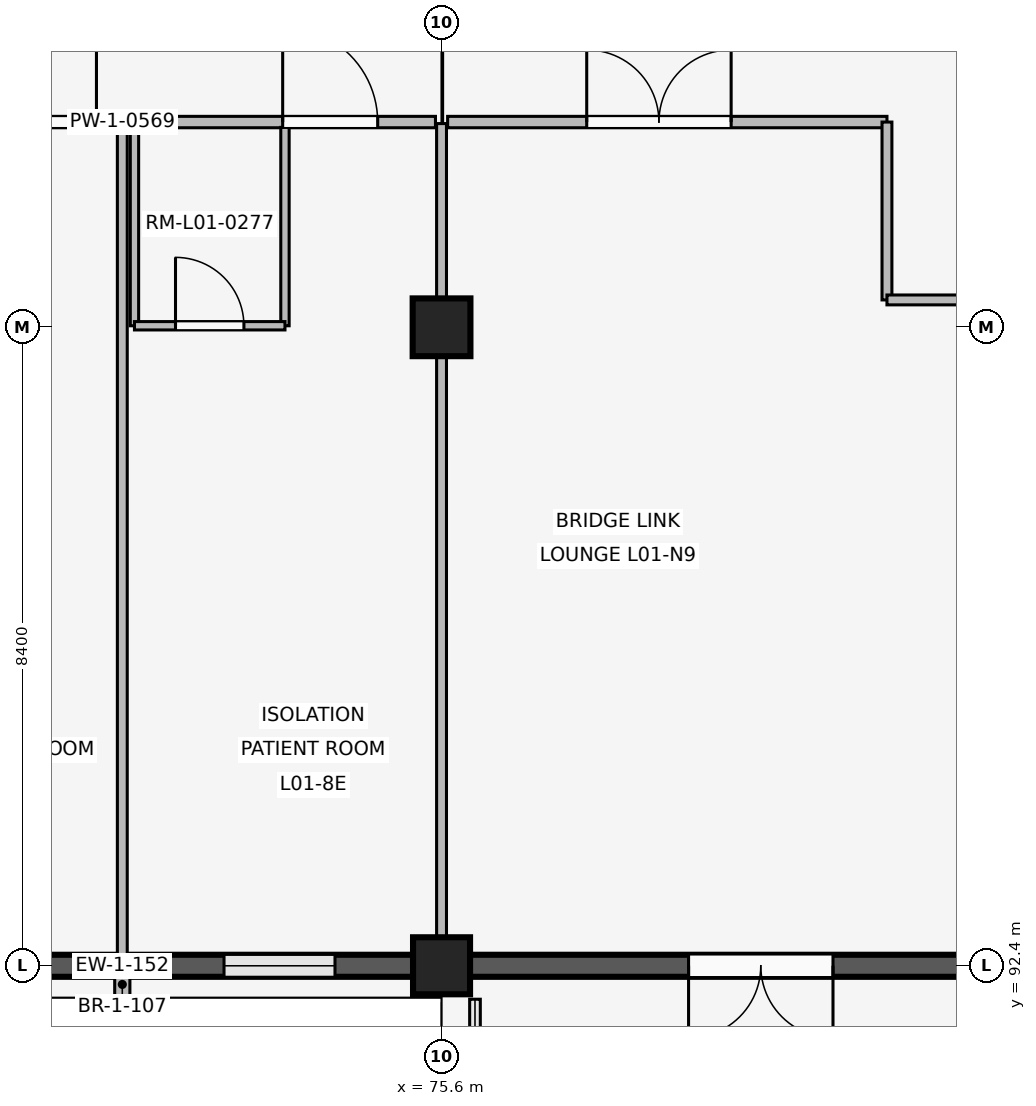
"""IFC4 building model, lengths in metres.
Left out: names, types, materials, properties, quantities, classifications, styles, units other than length and angle.
Written with IfcOpenShell. Run it as: python <this file> out.ifc"""

import sys

from ifc_helpers import new_model, si_unit, direction, frame, frame_2d, origin, origin_2d, place, context, subcontext, project, spatial, rectangle, extrude, element, fill, save


model = new_model("IFC4")
c1 = context("Model", 3, precision=1e-05, world=origin(), true_north=direction((0.0, 1.0)))
c2 = subcontext(c1, "Body", "Model", "MODEL_VIEW")
j1 = project(units=[si_unit("LENGTHUNIT", "METRE"), si_unit("PLANEANGLEUNIT", "RADIAN")], contexts=[c1])
p1 = place(None, origin())
s1 = spatial("IfcSite", under=j1, at=p1, CompositionType="ELEMENT")
p2 = place(p1, origin())
s2 = spatial("IfcBuilding", under=s1, at=p2, CompositionType="ELEMENT")
p3 = place(p2, frame((0.0, 0.0, 4.8)))
s3 = spatial("IfcBuildingStorey", under=s2, at=p3, CompositionType="ELEMENT", Elevation=4.8)
p4 = place(p3, frame((75.6, 92.4, 0.0), z_axis=(0.0, 0.0, 1.0), x_axis=(1.0, 0.0, 0.0)))
e1 = element("IfcColumn", 1, at=p4, inside=s3, PredefinedType="COLUMN", context=c2, shape_type="SweptSolid", body=[
    extrude(rectangle(XDim=0.75, YDim=0.75, at=origin_2d()), origin(), (0.0, 0.0, 1.0), 3.3),
])
p5 = place(p3, frame((75.6, 100.8, 0.0), z_axis=(0.0, 0.0, 1.0), x_axis=(1.0, 0.0, 0.0)))
e2 = element("IfcColumn", 2, at=p5, inside=s3, PredefinedType="COLUMN", context=c2, shape_type="SweptSolid", body=[
    extrude(rectangle(XDim=0.76, YDim=0.76, at=origin_2d()), origin(), (0.0, 0.0, 1.0), 3.3),
])
p6 = place(p3, frame((75.23, 92.4, 0.0), z_axis=(0.0, 0.0, 1.0), x_axis=(-1.0, 0.0, 0.0)))
e3 = element("IfcWall", 3, at=p6, inside=s3, PredefinedType="SOLIDWALL", context=c2, shape_type="SweptSolid", body=[
    extrude(rectangle(XDim=7.66, YDim=0.29, at=frame_2d((3.83, 0.0))), origin(), (0.0, 0.0, 1.0), 2.42),
])
p7 = place(p6, frame((1.032, 0.0, 0.85)))
e4 = element("IfcOpeningElement", 4, at=p7, cuts=e3, PredefinedType="OPENING", context=c2, shape_type="SweptSolid", body=[
    extrude(rectangle(XDim=1.46, YDim=0.85, at=frame_2d((0.73, 0.425))), frame((0.0, 0.155, 0.0), z_axis=(0.0, -1.0, 0.0), x_axis=(1.0, 0.0, 0.0)), (0.0, 0.0, 1.0), 0.31),
])
p8 = place(p6, frame((5.168, 0.0, 0.85)))
e5 = element("IfcOpeningElement", 5, at=p8, cuts=e3, PredefinedType="OPENING", context=c2, shape_type="SweptSolid", body=[
    extrude(rectangle(XDim=1.46, YDim=0.85, at=frame_2d((0.73, 0.425))), frame((0.0, 0.155, 0.0), z_axis=(0.0, -1.0, 0.0), x_axis=(1.0, 0.0, 0.0)), (0.0, 0.0, 1.0), 0.31),
])
p9 = place(p3, frame((71.4, 92.325, 0.0), z_axis=(0.0, 0.0, 1.0), x_axis=(0.0, -1.0, 0.0)))
e6 = element("IfcWall", 6, at=p9, inside=s3, PredefinedType="ELEMENTEDWALL", context=c2, shape_type="SweptSolid", body=[
    extrude(rectangle(XDim=0.34, YDim=0.2, at=frame_2d((0.17, 0.0))), origin(), (0.0, 0.0, 1.0), 2.4),
])
p10 = place(p3, frame((83.63, 92.4, 0.0), z_axis=(0.0, 0.0, 1.0), x_axis=(-1.0, 0.0, 0.0)))
e7 = element("IfcWall", 7, at=p10, inside=s3, PredefinedType="SOLIDWALL", context=c2, shape_type="SweptSolid", body=[
    extrude(rectangle(XDim=7.66, YDim=0.29, at=frame_2d((3.83, 0.0))), origin(), (0.0, 0.0, 1.0), 2.42),
])
p11 = place(p10, frame((2.88, 0.0, 0.0)))
e8 = element("IfcOpeningElement", 8, at=p11, cuts=e7, PredefinedType="OPENING", context=c2, shape_type="SweptSolid", body=[
    extrude(rectangle(XDim=1.9, YDim=2.3, at=frame_2d((0.95, 1.15))), frame((0.0, 0.155, 0.0), z_axis=(0.0, -1.0, 0.0), x_axis=(1.0, 0.0, 0.0)), (0.0, 0.0, 1.0), 0.31),
])
p12 = place(p3, frame((67.28, 103.5, 0.0), z_axis=(0.0, 0.0, 1.0), x_axis=(1.0, 0.0, 0.0)))
e9 = element("IfcWall", 9, at=p12, inside=s3, PredefinedType="PARTITIONING", context=c2, shape_type="SweptSolid", body=[
    extrude(rectangle(XDim=8.24, YDim=0.15, at=frame_2d((4.12, 0.0))), origin(), (0.0, 0.0, 1.0), 2.4),
])
p13 = place(p12, frame((2.53, 0.0, 0.0)))
e10 = element("IfcOpeningElement", 10, at=p13, cuts=e9, PredefinedType="OPENING", context=c2, shape_type="SweptSolid", body=[
    extrude(rectangle(XDim=1.25, YDim=2.2, at=frame_2d((0.625, 1.1))), frame((0.0, 0.085, 0.0), z_axis=(0.0, -1.0, 0.0), x_axis=(1.0, 0.0, 0.0)), (0.0, 0.0, 1.0), 0.17),
])
p14 = place(p12, frame((6.23, 0.0, 0.0)))
e11 = element("IfcOpeningElement", 11, at=p14, cuts=e9, PredefinedType="OPENING", context=c2, shape_type="SweptSolid", body=[
    extrude(rectangle(XDim=1.25, YDim=2.2, at=frame_2d((0.625, 1.1))), frame((0.0, 0.085, 0.0), z_axis=(0.0, -1.0, 0.0), x_axis=(1.0, 0.0, 0.0)), (0.0, 0.0, 1.0), 0.17),
])
p15 = place(p3, frame((71.4, 92.5, 0.0), z_axis=(0.0, 0.0, 1.0), x_axis=(0.0, 1.0, 0.0)))
e12 = element("IfcWall", 12, at=p15, inside=s3, PredefinedType="PARTITIONING", context=c2, shape_type="SweptSolid", body=[
    extrude(rectangle(XDim=10.93, YDim=0.13, at=frame_2d((5.465, 0.0))), origin(), (0.0, 0.0, 1.0), 2.4),
])
for number, where, z_axis, x_axis in (
    (13, (71.56, 100.82, 0.0), (0.0, 0.0, 1.0), (0.0, 1.0, 0.0)),
    (14, (73.54, 100.82, 0.0), (0.0, 0.0, 1.0), (0.0, 1.0, 0.0)),
):
    element("IfcWall", number, at=place(p3, frame(where, z_axis=z_axis, x_axis=x_axis)), inside=s3, PredefinedType="PARTITIONING", context=c2, shape_type="SweptSolid", body=[
        extrude(rectangle(XDim=2.61, YDim=0.11, at=frame_2d((1.305, 0.0))), origin(), (0.0, 0.0, 1.0), 2.4),
    ])
p16 = place(p3, frame((71.56, 100.82, 0.0), z_axis=(0.0, 0.0, 1.0), x_axis=(1.0, 0.0, 0.0)))
e15 = element("IfcWall", 15, at=p16, inside=s3, PredefinedType="PARTITIONING", context=c2, shape_type="SweptSolid", body=[
    extrude(rectangle(XDim=1.98, YDim=0.11, at=frame_2d((0.99, 0.0))), origin(), (0.0, 0.0, 1.0), 2.4),
])
p17 = place(p16, frame((0.54, 0.0, 0.0)))
e16 = element("IfcOpeningElement", 16, at=p17, cuts=e15, PredefinedType="OPENING", context=c2, shape_type="SweptSolid", body=[
    extrude(rectangle(XDim=0.9, YDim=2.1, at=frame_2d((0.45, 1.05))), frame((0.0, 0.065, 0.0), z_axis=(0.0, -1.0, 0.0), x_axis=(1.0, 0.0, 0.0)), (0.0, 0.0, 1.0), 0.13),
])
p18 = place(p3, frame((75.6, 92.54, 0.0), z_axis=(0.0, 0.0, 1.0), x_axis=(0.0, 1.0, 0.0)))
e17 = element("IfcWall", 17, at=p18, inside=s3, PredefinedType="PARTITIONING", context=c2, shape_type="SweptSolid", body=[
    extrude(rectangle(XDim=10.94, YDim=0.13, at=frame_2d((5.47, 0.0))), origin(), (0.0, 0.0, 1.0), 2.4),
])
p19 = place(p3, frame((75.68, 103.5, 0.0), z_axis=(0.0, 0.0, 1.0), x_axis=(1.0, 0.0, 0.0)))
e18 = element("IfcWall", 18, at=p19, inside=s3, PredefinedType="PARTITIONING", context=c2, shape_type="SweptSolid", body=[
    extrude(rectangle(XDim=5.78, YDim=0.15, at=frame_2d((2.89, 0.0))), origin(), (0.0, 0.0, 1.0), 2.4),
])
p20 = place(p19, frame((1.83, 0.0, 0.0)))
e19 = element("IfcOpeningElement", 19, at=p20, cuts=e18, PredefinedType="OPENING", context=c2, shape_type="SweptSolid", body=[
    extrude(rectangle(XDim=1.9, YDim=2.32, at=frame_2d((0.95, 1.16))), frame((0.0, 0.085, 0.0), z_axis=(0.0, -1.0, 0.0), x_axis=(1.0, 0.0, 0.0)), (0.0, 0.0, 1.0), 0.17),
])
p21 = place(p3, frame((81.46, 101.16, 0.0), z_axis=(0.0, 0.0, 1.0), x_axis=(0.0, 1.0, 0.0)))
e20 = element("IfcWall", 20, at=p21, inside=s3, PredefinedType="PARTITIONING", context=c2, shape_type="SweptSolid", body=[
    extrude(rectangle(XDim=2.34, YDim=0.13, at=frame_2d((1.17, 0.0))), origin(), (0.0, 0.0, 1.0), 2.4),
])
p22 = place(p3, frame((81.46, 101.16, 0.0), z_axis=(0.0, 0.0, 1.0), x_axis=(1.0, 0.0, 0.0)))
e21 = element("IfcWall", 21, at=p22, inside=s3, PredefinedType="PARTITIONING", context=c2, shape_type="SweptSolid", body=[
    extrude(rectangle(XDim=2.18, YDim=0.13, at=frame_2d((1.09, 0.0))), origin(), (0.0, 0.0, 1.0), 2.4),
])
p23 = place(p7, origin())
e22 = element("IfcWindow", 22, at=p23, inside=s3, PartitioningType="SINGLE_PANEL", PredefinedType="WINDOW", context=c2, shape_type="SweptSolid", body=[
    extrude(rectangle(XDim=1.46, YDim=0.85, at=frame_2d((0.73, 0.425))), frame((0.0, 0.03, 0.0), z_axis=(0.0, -1.0, 0.0), x_axis=(1.0, 0.0, 0.0)), (0.0, 0.0, 1.0), 0.06),
])
fill(e4, e22)
p24 = place(p11, origin())
e23 = element("IfcDoor", 23, at=p24, inside=s3, OperationType="DOUBLE_SWING_LEFT", PredefinedType="DOOR", context=c2, shape_type="SweptSolid", body=[
    extrude(rectangle(XDim=1.9, YDim=2.3, at=frame_2d((0.95, 1.15))), frame((0.0, 0.025, 0.0), z_axis=(0.0, -1.0, 0.0), x_axis=(1.0, 0.0, 0.0)), (0.0, 0.0, 1.0), 0.05),
])
fill(e8, e23)
p25 = place(p13, origin())
e24 = element("IfcDoor", 24, at=p25, inside=s3, OperationType="SINGLE_SWING_RIGHT", PredefinedType="DOOR", context=c2, shape_type="SweptSolid", body=[
    extrude(rectangle(XDim=1.25, YDim=2.2, at=frame_2d((0.625, 1.1))), frame((0.0, 0.025, 0.0), z_axis=(0.0, -1.0, 0.0), x_axis=(1.0, 0.0, 0.0)), (0.0, 0.0, 1.0), 0.05),
])
fill(e10, e24)
p26 = place(p14, origin())
e25 = element("IfcDoor", 25, at=p26, inside=s3, OperationType="SINGLE_SWING_LEFT", PredefinedType="DOOR", context=c2, shape_type="SweptSolid", body=[
    extrude(rectangle(XDim=1.25, YDim=2.2, at=frame_2d((0.625, 1.1))), frame((0.0, 0.025, 0.0), z_axis=(0.0, -1.0, 0.0), x_axis=(1.0, 0.0, 0.0)), (0.0, 0.0, 1.0), 0.05),
])
fill(e11, e25)
p27 = place(p17, origin())
e26 = element("IfcDoor", 26, at=p27, inside=s3, OperationType="SINGLE_SWING_LEFT", PredefinedType="DOOR", context=c2, shape_type="SweptSolid", body=[
    extrude(rectangle(XDim=0.9, YDim=2.1, at=frame_2d((0.45, 1.05))), frame((0.0, 0.025, 0.0), z_axis=(0.0, -1.0, 0.0), x_axis=(1.0, 0.0, 0.0)), (0.0, 0.0, 1.0), 0.05),
])
fill(e16, e26)
p28 = place(p20, origin())
e27 = element("IfcDoor", 27, at=p28, inside=s3, OperationType="DOUBLE_SWING_LEFT", PredefinedType="DOOR", context=c2, shape_type="SweptSolid", body=[
    extrude(rectangle(XDim=1.9, YDim=2.32, at=frame_2d((0.95, 1.16))), frame((0.0, 0.025, 0.0), z_axis=(0.0, -1.0, 0.0), x_axis=(1.0, 0.0, 0.0)), (0.0, 0.0, 1.0), 0.05),
])
fill(e19, e27)
save(model, sys.argv[1])
